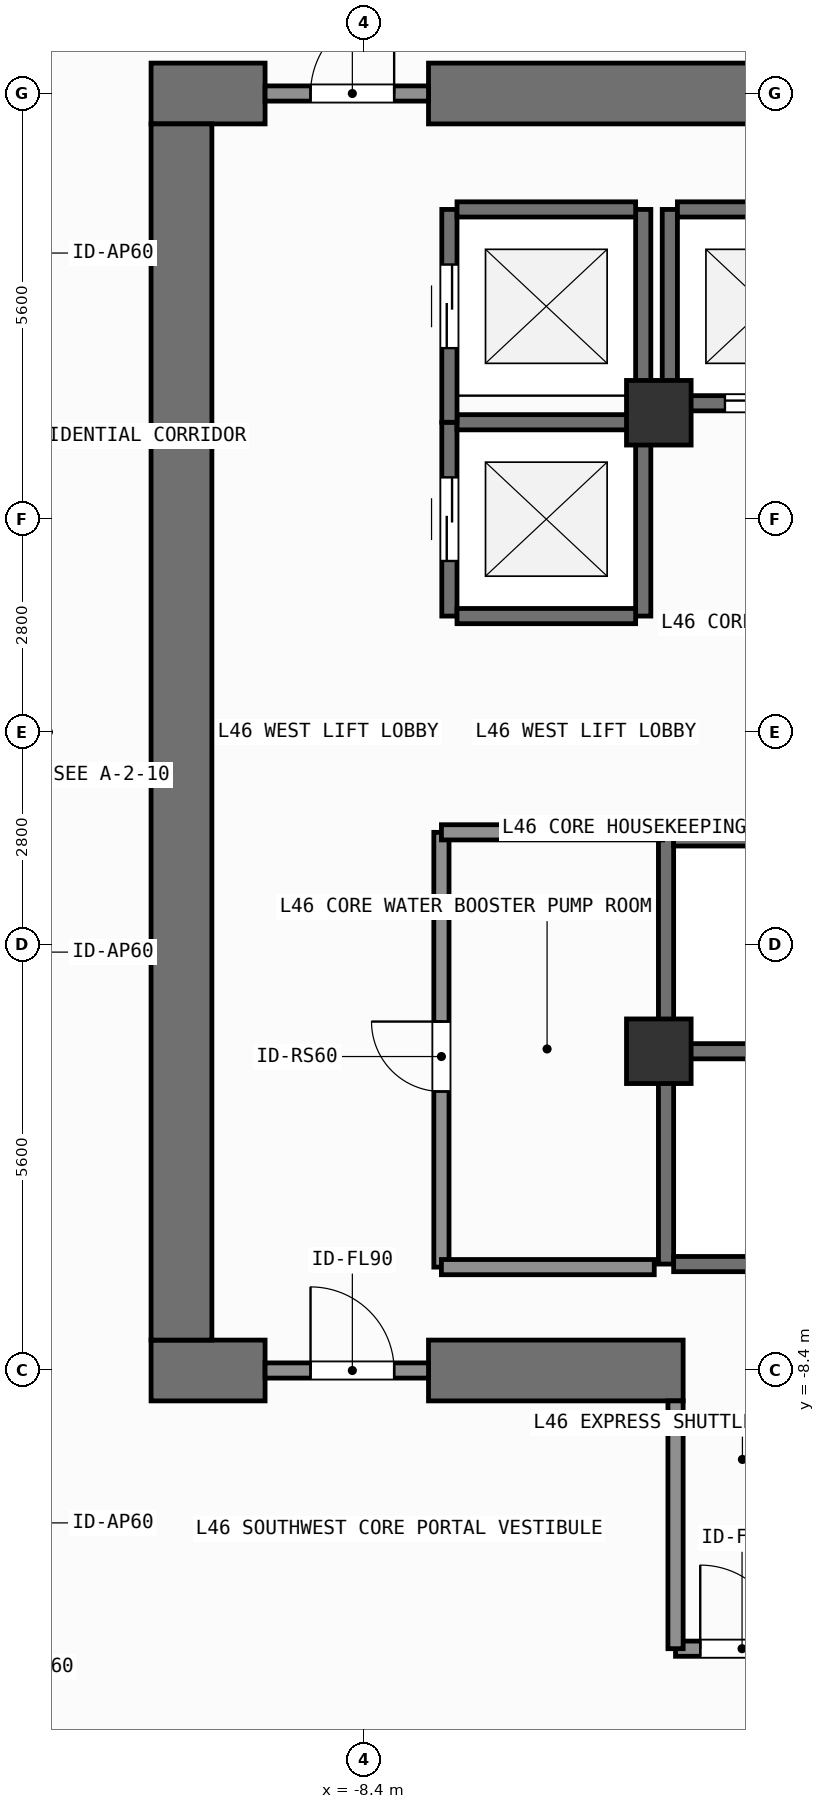
"""IFC4 building model, lengths in metres.
Left out: names, types, materials, properties, quantities, classifications, styles, units other than length and angle.
Written with IfcOpenShell. Run it as: python <this file> out.ifc"""

import sys

from ifc_helpers import new_model, si_unit, direction, frame, frame_2d, origin, origin_2d, place, context, subcontext, project, spatial, rectangle, extrude, element, fill, save


model = new_model("IFC4")
c1 = context("Model", 3, precision=1e-05, world=origin(), true_north=direction((0.0, 1.0)))
c2 = subcontext(c1, "Body", "Model", "MODEL_VIEW")
j1 = project(units=[si_unit("LENGTHUNIT", "METRE"), si_unit("PLANEANGLEUNIT", "RADIAN")], contexts=[c1])
p1 = place(None, origin())
s1 = spatial("IfcSite", under=j1, at=p1, CompositionType="ELEMENT")
p2 = place(p1, origin())
s2 = spatial("IfcBuilding", under=s1, at=p2, CompositionType="ELEMENT")
p3 = place(p2, frame((0.0, 0.0, 187.5)))
s3 = spatial("IfcBuildingStorey", under=s2, at=p3, CompositionType="ELEMENT", Elevation=187.5)
p4 = place(p3, frame((-11.2, -8.4, 0.0), z_axis=(0.0, 0.0, 1.0), x_axis=(1.0, 0.0, 0.0)))
e1 = element("IfcWall", 1, at=p4, inside=s3, PredefinedType="SHEAR", context=c2, shape_type="SweptSolid", body=[
    extrude(rectangle(XDim=1.5, YDim=0.8, at=frame_2d((0.75, 0.0))), origin(), (0.0, 0.0, 1.0), 3.9),
])
p5 = place(p3, frame((-7.55, -8.4, 0.0), z_axis=(0.0, 0.0, 1.0), x_axis=(1.0, 0.0, 0.0)))
e2 = element("IfcWall", 2, at=p5, inside=s3, PredefinedType="SHEAR", context=c2, shape_type="SweptSolid", body=[
    extrude(rectangle(XDim=3.35, YDim=0.8, at=frame_2d((1.675, 0.0))), origin(), (0.0, 0.0, 1.0), 3.9),
])
p6 = place(p3, frame((-11.2, 8.4, 0.0), z_axis=(0.0, 0.0, 1.0), x_axis=(1.0, 0.0, 0.0)))
e3 = element("IfcWall", 3, at=p6, inside=s3, PredefinedType="SHEAR", context=c2, shape_type="SweptSolid", body=[
    extrude(rectangle(XDim=1.5, YDim=0.8, at=frame_2d((0.75, 0.0))), origin(), (0.0, 0.0, 1.0), 3.9),
])
p7 = place(p3, frame((-7.55, 8.4, 0.0), z_axis=(0.0, 0.0, 1.0), x_axis=(1.0, 0.0, 0.0)))
e4 = element("IfcWall", 4, at=p7, inside=s3, PredefinedType="SHEAR", context=c2, shape_type="SweptSolid", body=[
    extrude(rectangle(XDim=16.35, YDim=0.8, at=frame_2d((8.175, 0.0))), origin(), (0.0, 0.0, 1.0), 3.9),
])
p8 = place(p3, frame((-10.8, -8.0, 0.0), z_axis=(0.0, 0.0, 1.0), x_axis=(0.0, 1.0, 0.0)))
e5 = element("IfcWall", 5, at=p8, inside=s3, PredefinedType="SHEAR", context=c2, shape_type="SweptSolid", body=[
    extrude(rectangle(XDim=16.0, YDim=0.8, at=frame_2d((8.0, 0.0))), origin(), (0.0, 0.0, 1.0), 3.9),
])
for number, where, z_axis, x_axis in (
    (6, (-4.52, -4.2, 0.0), (0.0, 0.0, 1.0), (1.0, 0.0, 0.0)),
    (7, (-4.52, 4.2, 0.0), (0.0, 0.0, 1.0), (1.0, 0.0, 0.0)),
):
    element("IfcColumn", number, at=place(p3, frame(where, z_axis=z_axis, x_axis=x_axis)), inside=s3, PredefinedType="COLUMN", context=c2, shape_type="SweptSolid", body=[
        extrude(rectangle(XDim=0.85, YDim=0.85, at=origin_2d()), origin(), (0.0, 0.0, 1.0), 3.9),
    ])
p9 = place(p3, frame((-7.275, 1.525, 0.0), z_axis=(0.0, 0.0, 1.0), x_axis=(0.0, 1.0, 0.0)))
e8 = element("IfcWall", 8, at=p9, inside=s3, PredefinedType="SHEAR", context=c2, shape_type="SweptSolid", body=[
    extrude(rectangle(XDim=2.55, YDim=0.2, at=frame_2d((1.275, 0.0))), origin(), (0.0, 0.0, 1.0), 3.62),
])
p10 = place(p9, frame((0.725, 0.0, 0.0)))
e9 = element("IfcOpeningElement", 9, at=p10, cuts=e8, PredefinedType="OPENING", context=c2, shape_type="SweptSolid", body=[
    extrude(rectangle(XDim=1.1, YDim=2.2, at=frame_2d((0.55, 1.1))), frame((0.0, 0.11, 0.0), z_axis=(0.0, -1.0, 0.0), x_axis=(1.0, 0.0, 0.0)), (0.0, 0.0, 1.0), 0.22),
])
p11 = place(p3, frame((-4.725, 1.525, 0.0), z_axis=(0.0, 0.0, 1.0), x_axis=(0.0, 1.0, 0.0)))
e10 = element("IfcWall", 10, at=p11, inside=s3, PredefinedType="SHEAR", context=c2, shape_type="SweptSolid", body=[
    extrude(rectangle(XDim=2.55, YDim=0.2, at=frame_2d((1.275, 0.0))), origin(), (0.0, 0.0, 1.0), 3.62),
])
for number, where, z_axis, x_axis in (
    (11, (-7.175, 1.525, 0.0), (0.0, 0.0, 1.0), (1.0, 0.0, 0.0)),
    (12, (-7.175, 4.075, 0.0), (0.0, 0.0, 1.0), (1.0, 0.0, 0.0)),
):
    element("IfcWall", number, at=place(p3, frame(where, z_axis=z_axis, x_axis=x_axis)), inside=s3, PredefinedType="SHEAR", context=c2, shape_type="SweptSolid", body=[
        extrude(rectangle(XDim=2.35, YDim=0.2, at=frame_2d((1.175, 0.0))), origin(), (0.0, 0.0, 1.0), 3.62),
    ])
p12 = place(p3, frame((-7.275, 4.075, 0.0), z_axis=(0.0, 0.0, 1.0), x_axis=(0.0, 1.0, 0.0)))
e13 = element("IfcWall", 13, at=p12, inside=s3, PredefinedType="SHEAR", context=c2, shape_type="SweptSolid", body=[
    extrude(rectangle(XDim=2.8, YDim=0.2, at=frame_2d((1.4, 0.0))), origin(), (0.0, 0.0, 1.0), 3.62),
])
p13 = place(p12, frame((0.975, 0.0, 0.0)))
e14 = element("IfcOpeningElement", 14, at=p13, cuts=e13, PredefinedType="OPENING", context=c2, shape_type="SweptSolid", body=[
    extrude(rectangle(XDim=1.1, YDim=2.2, at=frame_2d((0.55, 1.1))), frame((0.0, 0.11, 0.0), z_axis=(0.0, -1.0, 0.0), x_axis=(1.0, 0.0, 0.0)), (0.0, 0.0, 1.0), 0.22),
])
p14 = place(p3, frame((-4.725, 4.075, 0.0), z_axis=(0.0, 0.0, 1.0), x_axis=(0.0, 1.0, 0.0)))
e15 = element("IfcWall", 15, at=p14, inside=s3, PredefinedType="SHEAR", context=c2, shape_type="SweptSolid", body=[
    extrude(rectangle(XDim=2.8, YDim=0.2, at=frame_2d((1.4, 0.0))), origin(), (0.0, 0.0, 1.0), 3.62),
])
p15 = place(p3, frame((-7.175, 6.875, 0.0), z_axis=(0.0, 0.0, 1.0), x_axis=(1.0, 0.0, 0.0)))
e16 = element("IfcWall", 16, at=p15, inside=s3, PredefinedType="SHEAR", context=c2, shape_type="SweptSolid", body=[
    extrude(rectangle(XDim=2.35, YDim=0.2, at=frame_2d((1.175, 0.0))), origin(), (0.0, 0.0, 1.0), 3.62),
])
p16 = place(p3, frame((-4.375, 4.325, 0.0), z_axis=(0.0, 0.0, 1.0), x_axis=(0.0, 1.0, 0.0)))
e17 = element("IfcWall", 17, at=p16, inside=s3, PredefinedType="SHEAR", context=c2, shape_type="SweptSolid", body=[
    extrude(rectangle(XDim=2.55, YDim=0.2, at=frame_2d((1.275, 0.0))), origin(), (0.0, 0.0, 1.0), 3.62),
])
p17 = place(p3, frame((-4.275, 4.325, 0.0), z_axis=(0.0, 0.0, 1.0), x_axis=(1.0, 0.0, 0.0)))
e18 = element("IfcWall", 18, at=p17, inside=s3, PredefinedType="SHEAR", context=c2, shape_type="SweptSolid", body=[
    extrude(rectangle(XDim=2.35, YDim=0.2, at=frame_2d((1.175, 0.0))), origin(), (0.0, 0.0, 1.0), 3.62),
])
p18 = place(p17, frame((0.625, 0.0, 0.0)))
e19 = element("IfcOpeningElement", 19, at=p18, cuts=e18, PredefinedType="OPENING", context=c2, shape_type="SweptSolid", body=[
    extrude(rectangle(XDim=1.1, YDim=2.2, at=frame_2d((0.55, 1.1))), frame((0.0, 0.11, 0.0), z_axis=(0.0, -1.0, 0.0), x_axis=(1.0, 0.0, 0.0)), (0.0, 0.0, 1.0), 0.22),
])
p19 = place(p3, frame((-4.275, 6.875, 0.0), z_axis=(0.0, 0.0, 1.0), x_axis=(1.0, 0.0, 0.0)))
e20 = element("IfcWall", 20, at=p19, inside=s3, PredefinedType="SHEAR", context=c2, shape_type="SweptSolid", body=[
    extrude(rectangle(XDim=2.35, YDim=0.2, at=frame_2d((1.175, 0.0))), origin(), (0.0, 0.0, 1.0), 3.62),
])
p20 = place(p3, frame((-4.425, -7.0, 0.0), z_axis=(0.0, 0.0, 1.0), x_axis=(0.0, 1.0, 0.0)))
e21 = element("IfcWall", 21, at=p20, inside=s3, PredefinedType="SHEAR", context=c2, shape_type="SweptSolid", body=[
    extrude(rectangle(XDim=2.8, YDim=0.2, at=frame_2d((1.4, 0.0))), origin(), (0.0, 0.0, 1.0), 3.62),
])
for number, where, z_axis, x_axis in (
    (22, (-4.325, -7.0, 0.0), (0.0, 0.0, 1.0), (1.0, 0.0, 0.0)),
    (23, (-4.325, -4.2, 0.0), (0.0, 0.0, 1.0), (1.0, 0.0, 0.0)),
):
    element("IfcWall", number, at=place(p3, frame(where, z_axis=z_axis, x_axis=x_axis)), inside=s3, PredefinedType="SHEAR", context=c2, shape_type="SweptSolid", body=[
        extrude(rectangle(XDim=2.45, YDim=0.2, at=frame_2d((1.225, 0.0))), origin(), (0.0, 0.0, 1.0), 3.62),
    ])
p21 = place(p3, frame((-4.425, -4.2, 0.0), z_axis=(0.0, 0.0, 1.0), x_axis=(0.0, 1.0, 0.0)))
e24 = element("IfcWall", 24, at=p21, inside=s3, PredefinedType="SHEAR", context=c2, shape_type="SweptSolid", body=[
    extrude(rectangle(XDim=2.8, YDim=0.2, at=frame_2d((1.4, 0.0))), origin(), (0.0, 0.0, 1.0), 3.62),
])
p22 = place(p3, frame((-4.325, -1.4, 0.0), z_axis=(0.0, 0.0, 1.0), x_axis=(1.0, 0.0, 0.0)))
e25 = element("IfcWall", 25, at=p22, inside=s3, PredefinedType="SHEAR", context=c2, shape_type="SweptSolid", body=[
    extrude(rectangle(XDim=2.45, YDim=0.2, at=frame_2d((1.225, 0.0))), origin(), (0.0, 0.0, 1.0), 3.62),
])
p23 = place(p3, frame((-9.7, -8.4, 0.0), z_axis=(0.0, 0.0, 1.0), x_axis=(1.0, 0.0, 0.0)))
e26 = element("IfcWall", 26, at=p23, inside=s3, PredefinedType="SOLIDWALL", context=c2, shape_type="SweptSolid", body=[
    extrude(rectangle(XDim=2.15, YDim=0.2, at=frame_2d((1.075, 0.0))), origin(), (0.0, 0.0, 1.0), 2.76),
])
p24 = place(p23, frame((0.598, 0.0, 0.0)))
e27 = element("IfcOpeningElement", 27, at=p24, cuts=e26, PredefinedType="OPENING", context=c2, shape_type="SweptSolid", body=[
    extrude(rectangle(XDim=1.1, YDim=2.15, at=frame_2d((0.55, 1.075))), frame((0.0, 0.11, 0.0), z_axis=(0.0, -1.0, 0.0), x_axis=(1.0, 0.0, 0.0)), (0.0, 0.0, 1.0), 0.22),
])
p25 = place(p3, frame((-9.7, 8.4, 0.0), z_axis=(0.0, 0.0, 1.0), x_axis=(1.0, 0.0, 0.0)))
e28 = element("IfcWall", 28, at=p25, inside=s3, PredefinedType="SOLIDWALL", context=c2, shape_type="SweptSolid", body=[
    extrude(rectangle(XDim=2.15, YDim=0.2, at=frame_2d((1.075, 0.0))), origin(), (0.0, 0.0, 1.0), 2.76),
])
p26 = place(p25, frame((0.598, 0.0, 0.0)))
e29 = element("IfcOpeningElement", 29, at=p26, cuts=e28, PredefinedType="OPENING", context=c2, shape_type="SweptSolid", body=[
    extrude(rectangle(XDim=1.1, YDim=2.15, at=frame_2d((0.55, 1.075))), frame((0.0, 0.11, 0.0), z_axis=(0.0, -1.0, 0.0), x_axis=(1.0, 0.0, 0.0)), (0.0, 0.0, 1.0), 0.22),
])
p27 = place(p3, frame((-4.3, -12.06, 0.0), z_axis=(0.0, 0.0, 1.0), x_axis=(1.0, 0.0, 0.0)))
e30 = element("IfcWall", 30, at=p27, inside=s3, PredefinedType="SOLIDWALL", context=c2, shape_type="SweptSolid", body=[
    extrude(rectangle(XDim=1.75, YDim=0.2, at=frame_2d((0.875, 0.0))), origin(), (0.0, 0.0, 1.0), 3.62),
])
p28 = place(p27, frame((0.325, 0.0, 0.0)))
e31 = element("IfcOpeningElement", 31, at=p28, cuts=e30, PredefinedType="OPENING", context=c2, shape_type="SweptSolid", body=[
    extrude(rectangle(XDim=1.1, YDim=2.15, at=frame_2d((0.55, 1.075))), frame((0.0, 0.11, 0.0), z_axis=(0.0, -1.0, 0.0), x_axis=(1.0, 0.0, 0.0)), (0.0, 0.0, 1.0), 0.22),
])
p29 = place(p3, frame((-7.38, -7.04, 0.0), z_axis=(0.0, 0.0, 1.0), x_axis=(0.0, 1.0, 0.0)))
e32 = element("IfcWall", 32, at=p29, inside=s3, PredefinedType="SOLIDWALL", context=c2, shape_type="SweptSolid", body=[
    extrude(rectangle(XDim=5.72, YDim=0.2, at=frame_2d((2.86, 0.0))), origin(), (0.0, 0.0, 1.0), 3.62),
])
p30 = place(p29, frame((2.31, 0.0, 0.0)))
e33 = element("IfcOpeningElement", 33, at=p30, cuts=e32, PredefinedType="OPENING", context=c2, shape_type="SweptSolid", body=[
    extrude(rectangle(XDim=0.92, YDim=2.1, at=frame_2d((0.46, 1.05))), frame((0.0, 0.11, 0.0), z_axis=(0.0, -1.0, 0.0), x_axis=(1.0, 0.0, 0.0)), (0.0, 0.0, 1.0), 0.22),
])
p31 = place(p3, frame((-4.3, -12.06, 0.0), z_axis=(0.0, 0.0, 1.0), x_axis=(0.0, 1.0, 0.0)))
e34 = element("IfcWall", 34, at=p31, inside=s3, PredefinedType="SOLIDWALL", context=c2, shape_type="SweptSolid", body=[
    extrude(rectangle(XDim=3.26, YDim=0.2, at=frame_2d((1.63, 0.0))), origin(), (0.0, 0.0, 1.0), 3.62),
])
p32 = place(p3, frame((-7.38, -1.32, 0.0), z_axis=(0.0, 0.0, 1.0), x_axis=(1.0, 0.0, 0.0)))
e35 = element("IfcWall", 35, at=p32, inside=s3, PredefinedType="SOLIDWALL", context=c2, shape_type="SweptSolid", body=[
    extrude(rectangle(XDim=2.91, YDim=0.2, at=frame_2d((1.455, 0.0))), origin(), (0.0, 0.0, 1.0), 3.62),
])
p33 = place(p3, frame((-7.38, -7.04, 0.0), z_axis=(0.0, 0.0, 1.0), x_axis=(1.0, 0.0, 0.0)))
e36 = element("IfcWall", 36, at=p33, inside=s3, PredefinedType="SOLIDWALL", context=c2, shape_type="SweptSolid", body=[
    extrude(rectangle(XDim=2.8, YDim=0.2, at=frame_2d((1.4, 0.0))), origin(), (0.0, 0.0, 1.0), 3.62),
])
p34 = place(p10, origin())
e37 = element("IfcDoor", 37, at=p34, inside=s3, OperationType="SLIDING_TO_LEFT", PredefinedType="DOOR", context=c2, shape_type="SweptSolid", body=[
    extrude(rectangle(XDim=1.1, YDim=2.2, at=frame_2d((0.55, 1.1))), frame((0.0, 0.025, 0.0), z_axis=(0.0, -1.0, 0.0), x_axis=(1.0, 0.0, 0.0)), (0.0, 0.0, 1.0), 0.05),
])
fill(e9, e37)
p35 = place(p13, origin())
e38 = element("IfcDoor", 38, at=p35, inside=s3, OperationType="SLIDING_TO_LEFT", PredefinedType="DOOR", context=c2, shape_type="SweptSolid", body=[
    extrude(rectangle(XDim=1.1, YDim=2.2, at=frame_2d((0.55, 1.1))), frame((0.0, 0.025, 0.0), z_axis=(0.0, -1.0, 0.0), x_axis=(1.0, 0.0, 0.0)), (0.0, 0.0, 1.0), 0.05),
])
fill(e14, e38)
p36 = place(p18, origin())
e39 = element("IfcDoor", 39, at=p36, inside=s3, OperationType="SLIDING_TO_LEFT", PredefinedType="DOOR", context=c2, shape_type="SweptSolid", body=[
    extrude(rectangle(XDim=1.1, YDim=2.2, at=frame_2d((0.55, 1.1))), frame((0.0, 0.025, 0.0), z_axis=(0.0, -1.0, 0.0), x_axis=(1.0, 0.0, 0.0)), (0.0, 0.0, 1.0), 0.05),
])
fill(e19, e39)
p37 = place(p24, origin())
e40 = element("IfcDoor", 40, at=p37, inside=s3, OperationType="SINGLE_SWING_LEFT", PredefinedType="DOOR", context=c2, shape_type="SweptSolid", body=[
    extrude(rectangle(XDim=1.1, YDim=2.15, at=frame_2d((0.55, 1.075))), frame((0.0, 0.025, 0.0), z_axis=(0.0, -1.0, 0.0), x_axis=(1.0, 0.0, 0.0)), (0.0, 0.0, 1.0), 0.05),
])
fill(e27, e40)
p38 = place(p26, origin())
e41 = element("IfcDoor", 41, at=p38, inside=s3, OperationType="SINGLE_SWING_RIGHT", PredefinedType="DOOR", context=c2, shape_type="SweptSolid", body=[
    extrude(rectangle(XDim=1.1, YDim=2.15, at=frame_2d((0.55, 1.075))), frame((0.0, 0.025, 0.0), z_axis=(0.0, -1.0, 0.0), x_axis=(1.0, 0.0, 0.0)), (0.0, 0.0, 1.0), 0.05),
])
fill(e29, e41)
p39 = place(p28, origin())
e42 = element("IfcDoor", 42, at=p39, inside=s3, OperationType="SINGLE_SWING_LEFT", PredefinedType="DOOR", context=c2, shape_type="SweptSolid", body=[
    extrude(rectangle(XDim=1.1, YDim=2.15, at=frame_2d((0.55, 1.075))), frame((0.0, 0.025, 0.0), z_axis=(0.0, -1.0, 0.0), x_axis=(1.0, 0.0, 0.0)), (0.0, 0.0, 1.0), 0.05),
])
fill(e31, e42)
p40 = place(p30, origin())
e43 = element("IfcDoor", 43, at=p40, inside=s3, OperationType="SINGLE_SWING_RIGHT", PredefinedType="DOOR", context=c2, shape_type="SweptSolid", body=[
    extrude(rectangle(XDim=0.92, YDim=2.1, at=frame_2d((0.46, 1.05))), frame((0.0, 0.025, 0.0), z_axis=(0.0, -1.0, 0.0), x_axis=(1.0, 0.0, 0.0)), (0.0, 0.0, 1.0), 0.05),
])
fill(e33, e43)
save(model, sys.argv[1])
